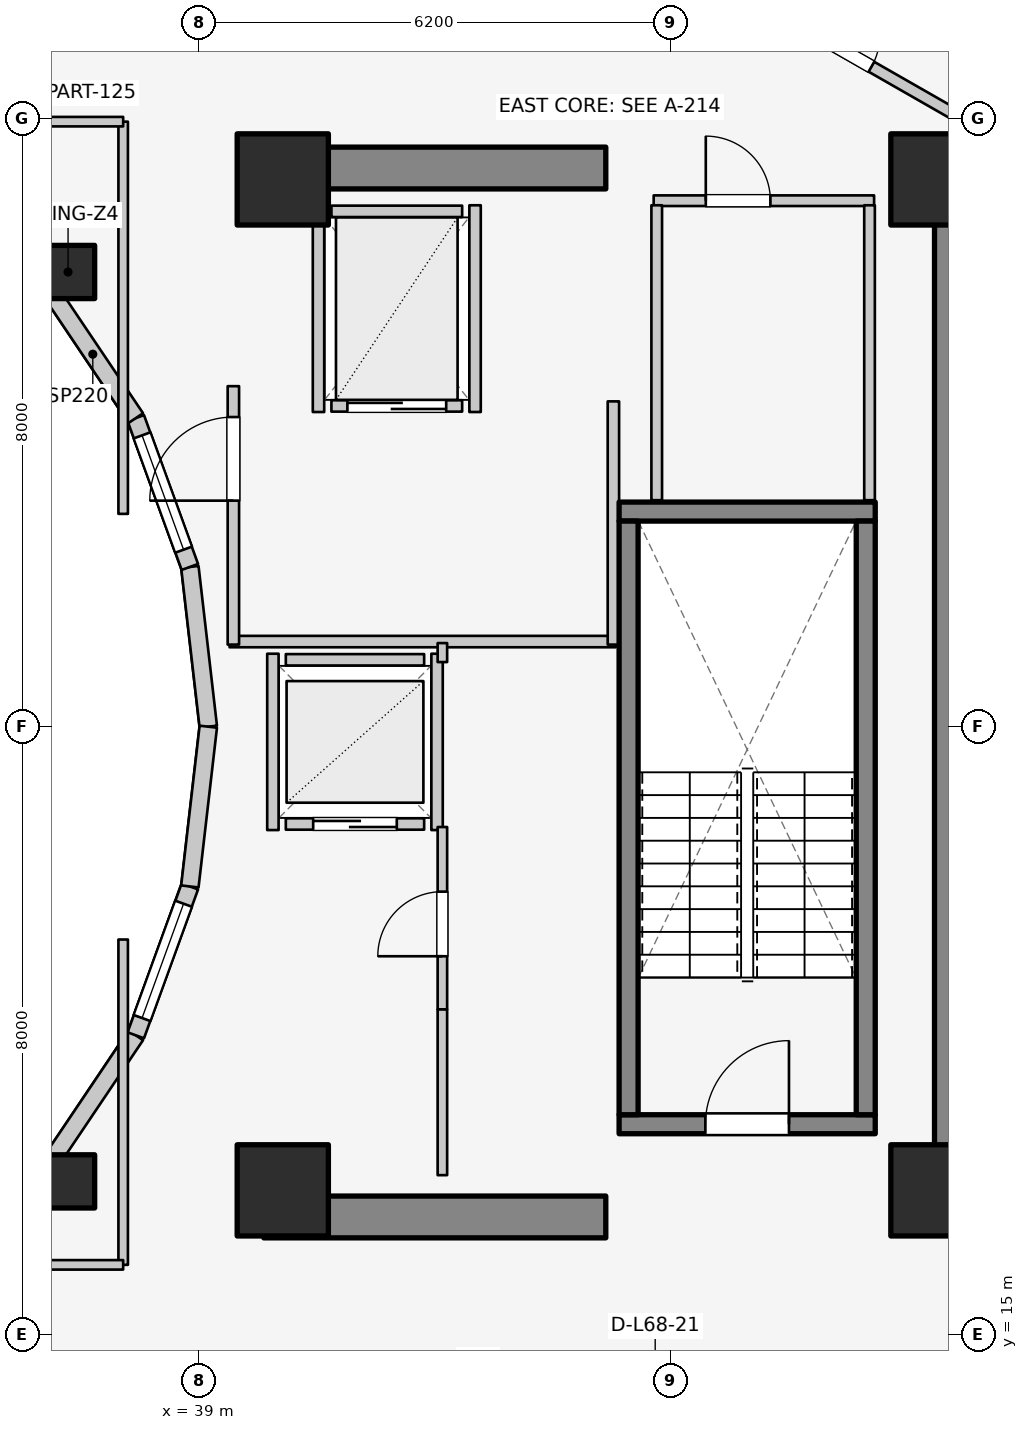
"""IFC4 building model, lengths in metres.
Left out: names, types, materials, properties, quantities, classifications, styles, units other than length and angle.
Written with IfcOpenShell. Run it as: python <this file> out.ifc"""

import sys

from ifc_helpers import new_model, si_unit, direction, frame, frame_2d, origin, origin_2d, place, context, subcontext, project, spatial, rectangle, extrude, element, fill, save


model = new_model("IFC4")
c1 = context("Model", 3, precision=1e-05, world=origin(), true_north=direction((0.0, 1.0)))
c2 = subcontext(c1, "Body", "Model", "MODEL_VIEW")
j1 = project(units=[si_unit("LENGTHUNIT", "METRE"), si_unit("PLANEANGLEUNIT", "RADIAN")], contexts=[c1])
p1 = place(None, origin())
s1 = spatial("IfcSite", under=j1, at=p1, CompositionType="ELEMENT")
p2 = place(p1, origin())
s2 = spatial("IfcBuilding", under=s1, at=p2, CompositionType="ELEMENT")
p3 = place(p2, frame((0.0, 0.0, 223.3)))
s3 = spatial("IfcBuildingStorey", under=s2, at=p3, CompositionType="ELEMENT", Elevation=223.3)
p4 = place(p3, frame((48.95, 17.05, 0.0), z_axis=(0.0, 0.0, 1.0), x_axis=(0.0, 1.0, 0.0)))
e1 = element("IfcWall", 1, at=p4, inside=s3, PredefinedType="SHEAR", context=c2, shape_type="SweptSolid", body=[
    extrude(rectangle(XDim=12.8, YDim=0.55, at=frame_2d((6.4, 0.0))), origin(), (0.0, 0.0, 1.0), 3.1),
])
for number, where, z_axis, x_axis in (
    (2, (39.85, 16.55, 0.0), (0.0, 0.0, 1.0), (1.0, 0.0, 0.0)),
    (3, (39.85, 30.35, 0.0), (0.0, 0.0, 1.0), (1.0, 0.0, 0.0)),
):
    element("IfcWall", number, at=place(p3, frame(where, z_axis=z_axis, x_axis=x_axis)), inside=s3, PredefinedType="SHEAR", context=c2, shape_type="SweptSolid", body=[
        extrude(rectangle(XDim=4.5, YDim=0.55, at=frame_2d((2.25, 0.0))), origin(), (0.0, 0.0, 1.0), 3.1),
    ])
p5 = place(p3, frame((44.525, 17.77, 0.0), z_axis=(0.0, 0.0, 1.0), x_axis=(1.0, 0.0, 0.0)))
e4 = element("IfcWall", 4, at=p5, inside=s3, PredefinedType="SOLIDWALL", context=c2, shape_type="SweptSolid", body=[
    extrude(rectangle(XDim=3.37, YDim=0.25, at=frame_2d((1.685, 0.0))), origin(), (0.0, 0.0, 1.0), 3.1),
])
p6 = place(p5, frame((1.135, 0.0, 0.0)))
e5 = element("IfcOpeningElement", 5, at=p6, cuts=e4, PredefinedType="OPENING", context=c2, shape_type="SweptSolid", body=[
    extrude(rectangle(XDim=1.1, YDim=2.1, at=frame_2d((0.55, 1.05))), frame((0.0, 0.135, 0.0), z_axis=(0.0, -1.0, 0.0), x_axis=(1.0, 0.0, 0.0)), (0.0, 0.0, 1.0), 0.27),
])
p7 = place(p3, frame((44.525, 25.83, 0.0), z_axis=(0.0, 0.0, 1.0), x_axis=(1.0, 0.0, 0.0)))
e6 = element("IfcWall", 6, at=p7, inside=s3, PredefinedType="SOLIDWALL", context=c2, shape_type="SweptSolid", body=[
    extrude(rectangle(XDim=3.37, YDim=0.25, at=frame_2d((1.685, 0.0))), origin(), (0.0, 0.0, 1.0), 3.1),
])
for number, where, z_axis, x_axis in (
    (7, (44.65, 17.895, 0.0), (0.0, 0.0, 1.0), (0.0, 1.0, 0.0)),
    (8, (47.77, 17.895, 0.0), (0.0, 0.0, 1.0), (0.0, 1.0, 0.0)),
):
    element("IfcWall", number, at=place(p3, frame(where, z_axis=z_axis, x_axis=x_axis)), inside=s3, PredefinedType="SOLIDWALL", context=c2, shape_type="SweptSolid", body=[
        extrude(rectangle(XDim=7.81, YDim=0.25, at=frame_2d((3.905, 0.0))), origin(), (0.0, 0.0, 1.0), 3.1),
    ])
for number, where, z_axis, x_axis in (
    (9, (40.1, 16.9, 0.0), (0.0, 0.0, 1.0), (1.0, 0.0, 0.0)),
    (10, (48.7, 16.9, 0.0), (0.0, 0.0, 1.0), (1.0, 0.0, 0.0)),
    (11, (48.7, 30.2, 0.0), (0.0, 0.0, 1.0), (1.0, 0.0, 0.0)),
    (12, (40.1, 30.2, 0.0), (0.0, 0.0, 1.0), (1.0, 0.0, 0.0)),
):
    element("IfcColumn", number, at=place(p3, frame(where, z_axis=z_axis, x_axis=x_axis)), inside=s3, PredefinedType="COLUMN", context=c2, shape_type="SweptSolid", body=[
        extrude(rectangle(XDim=1.2, YDim=1.2, at=origin_2d()), origin(), (0.0, 0.0, 1.0), 3.1),
    ])
for number, where, z_axis, x_axis in (
    (13, (37.275, 28.982, 0.0), (0.0, 0.0, 1.0), (1.0, 0.0, 0.0)),
    (14, (37.275, 17.018, 0.0), (0.0, 0.0, 1.0), (1.0, 0.0, 0.0)),
):
    element("IfcColumn", number, at=place(p3, frame(where, z_axis=z_axis, x_axis=x_axis)), inside=s3, PredefinedType="COLUMN", context=c2, shape_type="SweptSolid", body=[
        extrude(rectangle(XDim=0.7, YDim=0.7, at=origin_2d()), origin(), (0.0, 0.0, 1.0), 3.1),
    ])
p8 = place(p3, frame((39.12, 23.0, 0.0), z_axis=(0.0, 0.0, 1.0), x_axis=(-0.114711713601, 0.993398823617, 0.0)))
e15 = element("IfcWall", 15, at=p8, inside=s3, PredefinedType="STANDARD", context=c2, shape_type="SweptSolid", body=[
    extrude(rectangle(XDim=2.115, YDim=0.23, at=frame_2d((1.058, 0.0))), origin(), (0.0, 0.0, 1.0), 2.84),
])
p9 = place(p3, frame((38.877, 25.102, 0.0), z_axis=(0.0, 0.0, 1.0), x_axis=(-0.341423187295, 0.93990968033, 0.0)))
e16 = element("IfcWall", 16, at=p9, inside=s3, PredefinedType="STANDARD", context=c2, shape_type="SweptSolid", body=[
    extrude(rectangle(XDim=2.084, YDim=0.23, at=frame_2d((1.042, 0.0))), origin(), (0.0, 0.0, 1.0), 2.84),
])
p10 = place(p9, frame((0.242, 0.0, 0.85)))
e17 = element("IfcOpeningElement", 17, at=p10, cuts=e16, PredefinedType="OPENING", context=c2, shape_type="SweptSolid", body=[
    extrude(rectangle(XDim=1.6, YDim=1.65, at=frame_2d((0.8, 0.825))), frame((0.0, 0.125, 0.0), z_axis=(0.0, -1.0, 0.0), x_axis=(1.0, 0.0, 0.0)), (0.0, 0.0, 1.0), 0.25),
])
p11 = place(p3, frame((38.166, 27.06, 0.0), z_axis=(0.0, 0.0, 1.0), x_axis=(-0.558197800898, 0.829707909492, 0.0)))
e18 = element("IfcWall", 18, at=p11, inside=s3, PredefinedType="STANDARD", context=c2, shape_type="SweptSolid", body=[
    extrude(rectangle(XDim=2.027, YDim=0.23, at=frame_2d((1.013, 0.0))), origin(), (0.0, 0.0, 1.0), 2.16),
])
for number, where, z_axis, x_axis in (
    (19, (37.035, 28.742, 0.0), (0.0, 0.0, 1.0), (-0.753, 0.659, 0.0)),
    (20, (35.56, 15.968, 0.0), (0.0, 0.0, 1.0), (0.753, 0.659, 0.0)),
):
    element("IfcWall", number, at=place(p3, frame(where, z_axis=z_axis, x_axis=x_axis)), inside=s3, PredefinedType="STANDARD", context=c2, shape_type="SweptSolid", body=[
        extrude(rectangle(XDim=1.959, YDim=0.23, at=frame_2d((0.98, 0.0))), origin(), (0.0, 0.0, 1.0), 2.16),
    ])
p12 = place(p3, frame((37.035, 17.258, 0.0), z_axis=(0.0, 0.0, 1.0), x_axis=(0.558197800898, 0.829707909492, 0.0)))
e21 = element("IfcWall", 21, at=p12, inside=s3, PredefinedType="STANDARD", context=c2, shape_type="SweptSolid", body=[
    extrude(rectangle(XDim=2.027, YDim=0.23, at=frame_2d((1.013, 0.0))), origin(), (0.0, 0.0, 1.0), 2.16),
])
p13 = place(p3, frame((38.166, 18.94, 0.0), z_axis=(0.0, 0.0, 1.0), x_axis=(0.341423187295, 0.93990968033, 0.0)))
e22 = element("IfcWall", 22, at=p13, inside=s3, PredefinedType="STANDARD", context=c2, shape_type="SweptSolid", body=[
    extrude(rectangle(XDim=2.084, YDim=0.23, at=frame_2d((1.042, 0.0))), origin(), (0.0, 0.0, 1.0), 2.84),
])
p14 = place(p13, frame((0.242, 0.0, 0.85)))
e23 = element("IfcOpeningElement", 23, at=p14, cuts=e22, PredefinedType="OPENING", context=c2, shape_type="SweptSolid", body=[
    extrude(rectangle(XDim=1.6, YDim=1.65, at=frame_2d((0.8, 0.825))), frame((0.0, 0.125, 0.0), z_axis=(0.0, -1.0, 0.0), x_axis=(1.0, 0.0, 0.0)), (0.0, 0.0, 1.0), 0.25),
])
p15 = place(p3, frame((38.877, 20.898, 0.0), z_axis=(0.0, 0.0, 1.0), x_axis=(0.114711713601, 0.993398823617, 0.0)))
e24 = element("IfcWall", 24, at=p15, inside=s3, PredefinedType="STANDARD", context=c2, shape_type="SweptSolid", body=[
    extrude(rectangle(XDim=2.115, YDim=0.23, at=frame_2d((1.058, 0.0))), origin(), (0.0, 0.0, 1.0), 2.84),
])
p16 = place(p3, frame((50.761, 31.849, 0.0), z_axis=(0.0, 0.0, 1.0), x_axis=(-0.72731899451, 0.686299555752, 0.0)))
e25 = element("IfcWall", 25, at=p16, inside=s3, PredefinedType="STANDARD", context=c2, shape_type="SweptSolid", body=[
    extrude(rectangle(XDim=4.404, YDim=0.26, at=frame_2d((2.202, 0.0))), origin(), (0.0, 0.0, 1.0), 2.85),
])
p17 = place(p16, frame((0.867, 0.0, 0.75)))
e26 = element("IfcOpeningElement", 26, at=p17, cuts=e25, PredefinedType="OPENING", context=c2, shape_type="SweptSolid", body=[
    extrude(rectangle(XDim=1.2, YDim=1.5, at=frame_2d((0.6, 0.75))), frame((0.0, 0.14, 0.0), z_axis=(0.0, -1.0, 0.0), x_axis=(1.0, 0.0, 0.0)), (0.0, 0.0, 1.0), 0.28),
])
p18 = place(p3, frame((40.14, 21.72, 0.0), z_axis=(0.0, 0.0, 1.0), x_axis=(1.0, 0.0, 0.0)))
e27 = element("IfcWall", 27, at=p18, inside=s3, PredefinedType="SOLIDWALL", context=c2, shape_type="SweptSolid", body=[
    extrude(rectangle(XDim=1.82, YDim=0.15, at=frame_2d((0.91, 0.0))), origin(), (0.0, 0.0, 1.0), 2.12),
])
p19 = place(p18, frame((0.36, 0.0, 0.0)))
e28 = element("IfcOpeningElement", 28, at=p19, cuts=e27, PredefinedType="OPENING", context=c2, shape_type="SweptSolid", body=[
    extrude(rectangle(XDim=1.1, YDim=2.1, at=frame_2d((0.55, 1.05))), frame((0.0, 0.085, 0.0), z_axis=(0.0, -1.0, 0.0), x_axis=(1.0, 0.0, 0.0)), (0.0, 0.0, 1.0), 0.17),
])
p20 = place(p3, frame((40.14, 23.88, 0.0), z_axis=(0.0, 0.0, 1.0), x_axis=(1.0, 0.0, 0.0)))
e29 = element("IfcWall", 29, at=p20, inside=s3, PredefinedType="SOLIDWALL", context=c2, shape_type="SweptSolid", body=[
    extrude(rectangle(XDim=1.82, YDim=0.15, at=frame_2d((0.91, 0.0))), origin(), (0.0, 0.0, 1.0), 2.12),
])
p21 = place(p3, frame((39.97, 21.64, 0.0), z_axis=(0.0, 0.0, 1.0), x_axis=(0.0, 1.0, 0.0)))
e30 = element("IfcWall", 30, at=p21, inside=s3, PredefinedType="SOLIDWALL", context=c2, shape_type="SweptSolid", body=[
    extrude(rectangle(XDim=2.32, YDim=0.15, at=frame_2d((1.16, 0.0))), origin(), (0.0, 0.0, 1.0), 2.12),
])
p22 = place(p3, frame((42.13, 21.64, 0.0), z_axis=(0.0, 0.0, 1.0), x_axis=(0.0, 1.0, 0.0)))
e31 = element("IfcWall", 31, at=p22, inside=s3, PredefinedType="SOLIDWALL", context=c2, shape_type="SweptSolid", body=[
    extrude(rectangle(XDim=2.32, YDim=0.15, at=frame_2d((1.16, 0.0))), origin(), (0.0, 0.0, 1.0), 2.855),
])
p23 = place(p3, frame((40.74, 27.22, 0.0), z_axis=(0.0, 0.0, 1.0), x_axis=(1.0, 0.0, 0.0)))
e32 = element("IfcWall", 32, at=p23, inside=s3, PredefinedType="SOLIDWALL", context=c2, shape_type="SweptSolid", body=[
    extrude(rectangle(XDim=1.72, YDim=0.15, at=frame_2d((0.86, 0.0))), origin(), (0.0, 0.0, 1.0), 2.855),
])
p24 = place(p23, frame((0.21, 0.0, 0.0)))
e33 = element("IfcOpeningElement", 33, at=p24, cuts=e32, PredefinedType="OPENING", context=c2, shape_type="SweptSolid", body=[
    extrude(rectangle(XDim=1.3, YDim=2.1, at=frame_2d((0.65, 1.05))), frame((0.0, 0.085, 0.0), z_axis=(0.0, -1.0, 0.0), x_axis=(1.0, 0.0, 0.0)), (0.0, 0.0, 1.0), 0.17),
])
p25 = place(p3, frame((40.74, 29.78, 0.0), z_axis=(0.0, 0.0, 1.0), x_axis=(1.0, 0.0, 0.0)))
e34 = element("IfcWall", 34, at=p25, inside=s3, PredefinedType="SOLIDWALL", context=c2, shape_type="SweptSolid", body=[
    extrude(rectangle(XDim=1.72, YDim=0.15, at=frame_2d((0.86, 0.0))), origin(), (0.0, 0.0, 1.0), 2.855),
])
for number, where, z_axis, x_axis in (
    (35, (40.57, 27.14, 0.0), (0.0, 0.0, 1.0), (0.0, 1.0, 0.0)),
    (36, (42.63, 27.14, 0.0), (0.0, 0.0, 1.0), (0.0, 1.0, 0.0)),
):
    element("IfcWall", number, at=place(p3, frame(where, z_axis=z_axis, x_axis=x_axis)), inside=s3, PredefinedType="SOLIDWALL", context=c2, shape_type="SweptSolid", body=[
        extrude(rectangle(XDim=2.72, YDim=0.15, at=frame_2d((1.36, 0.0))), origin(), (0.0, 0.0, 1.0), 2.855),
    ])
p26 = place(p3, frame((39.4, 24.12, 0.0), z_axis=(0.0, 0.0, 1.0), x_axis=(1.0, 0.0, 0.0)))
e37 = element("IfcWall", 37, at=p26, inside=s3, PredefinedType="PARTITIONING", context=c2, shape_type="SweptSolid", body=[
    extrude(rectangle(XDim=5.08, YDim=0.15, at=frame_2d((2.54, 0.0))), origin(), (0.0, 0.0, 1.0), 2.12),
])
p27 = place(p3, frame((44.45, 24.08, 0.0), z_axis=(0.0, 0.0, 1.0), x_axis=(0.0, 1.0, 0.0)))
e38 = element("IfcWall", 38, at=p27, inside=s3, PredefinedType="PARTITIONING", context=c2, shape_type="SweptSolid", body=[
    extrude(rectangle(XDim=3.2, YDim=0.15, at=frame_2d((1.6, 0.0))), origin(), (0.0, 0.0, 1.0), 2.855),
])
p28 = place(p3, frame((39.45, 24.08, 0.0), z_axis=(0.0, 0.0, 1.0), x_axis=(0.0, 1.0, 0.0)))
e39 = element("IfcWall", 39, at=p28, inside=s3, PredefinedType="PARTITIONING", context=c2, shape_type="SweptSolid", body=[
    extrude(rectangle(XDim=3.4, YDim=0.15, at=frame_2d((1.7, 0.0))), origin(), (0.0, 0.0, 1.0), 2.855),
])
p29 = place(p28, frame((1.894, 0.0, 0.0)))
e40 = element("IfcOpeningElement", 40, at=p29, cuts=e39, PredefinedType="OPENING", context=c2, shape_type="SweptSolid", body=[
    extrude(rectangle(XDim=1.1, YDim=2.1, at=frame_2d((0.55, 1.05))), frame((0.0, 0.085, 0.0), z_axis=(0.0, -1.0, 0.0), x_axis=(1.0, 0.0, 0.0)), (0.0, 0.0, 1.0), 0.17),
])
p30 = place(p3, frame((42.2, 19.28, 0.0), z_axis=(0.0, 0.0, 1.0), x_axis=(0.0, 1.0, 0.0)))
e41 = element("IfcWall", 41, at=p30, inside=s3, PredefinedType="PARTITIONING", context=c2, shape_type="SweptSolid", body=[
    extrude(rectangle(XDim=2.4, YDim=0.125, at=frame_2d((1.2, 0.0))), origin(), (0.0, 0.0, 1.0), 2.855),
])
p31 = place(p30, frame((0.7, 0.0, 0.0)))
e42 = element("IfcOpeningElement", 42, at=p31, cuts=e41, PredefinedType="OPENING", context=c2, shape_type="SweptSolid", body=[
    extrude(rectangle(XDim=0.85, YDim=2.05, at=frame_2d((0.425, 1.025))), frame((0.0, 0.073, 0.0), z_axis=(0.0, -1.0, 0.0), x_axis=(1.0, 0.0, 0.0)), (0.0, 0.0, 1.0), 0.145),
])
p32 = place(p3, frame((42.2, 23.85, 0.0), z_axis=(0.0, 0.0, 1.0), x_axis=(0.0, 1.0, 0.0)))
e43 = element("IfcWall", 43, at=p32, inside=s3, PredefinedType="PARTITIONING", context=c2, shape_type="SweptSolid", body=[
    extrude(rectangle(XDim=0.25, YDim=0.125, at=frame_2d((0.125, 0.0))), origin(), (0.0, 0.0, 1.0), 2.855),
])
p33 = place(p3, frame((42.2, 17.1, 0.0), z_axis=(0.0, 0.0, 1.0), x_axis=(0.0, 1.0, 0.0)))
e44 = element("IfcWall", 44, at=p33, inside=s3, PredefinedType="PARTITIONING", context=c2, shape_type="SweptSolid", body=[
    extrude(rectangle(XDim=2.18, YDim=0.125, at=frame_2d((1.09, 0.0))), origin(), (0.0, 0.0, 1.0), 2.855),
])
p34 = place(p3, frame((44.98, 29.92, 0.0), z_axis=(0.0, 0.0, 1.0), x_axis=(1.0, 0.0, 0.0)))
e45 = element("IfcWall", 45, at=p34, inside=s3, PredefinedType="PLUMBINGWALL", context=c2, shape_type="SweptSolid", body=[
    extrude(rectangle(XDim=2.9, YDim=0.14, at=frame_2d((1.45, 0.0))), origin(), (0.0, 0.0, 1.0), 2.855),
])
p35 = place(p34, frame((0.686, 0.0, 0.0)))
e46 = element("IfcOpeningElement", 46, at=p35, cuts=e45, PredefinedType="OPENING", context=c2, shape_type="SweptSolid", body=[
    extrude(rectangle(XDim=0.85, YDim=2.05, at=frame_2d((0.425, 1.025))), frame((0.0, 0.08, 0.0), z_axis=(0.0, -1.0, 0.0), x_axis=(1.0, 0.0, 0.0)), (0.0, 0.0, 1.0), 0.16),
])
for number, where, z_axis, x_axis in (
    (47, (45.02, 25.98, 0.0), (0.0, 0.0, 1.0), (0.0, 1.0, 0.0)),
    (48, (47.82, 25.98, 0.0), (0.0, 0.0, 1.0), (0.0, 1.0, 0.0)),
):
    element("IfcWall", number, at=place(p3, frame(where, z_axis=z_axis, x_axis=x_axis)), inside=s3, PredefinedType="PLUMBINGWALL", context=c2, shape_type="SweptSolid", body=[
        extrude(rectangle(XDim=3.88, YDim=0.14, at=frame_2d((1.94, 0.0))), origin(), (0.0, 0.0, 1.0), 2.855),
    ])
p36 = place(p3, frame((35.55, 30.015, 0.0), z_axis=(0.0, 0.0, 1.0), x_axis=(0.523992004803, 0.851723182086, 0.0)))
e49 = element("IfcWall", 49, at=p36, inside=s3, PredefinedType="PARTITIONING", context=c2, shape_type="SweptSolid", body=[
    extrude(rectangle(XDim=3.101, YDim=0.125, at=frame_2d((1.551, 0.0))), origin(), (0.0, 0.0, 1.0), 2.376),
])
p37 = place(p3, frame((38.0, 25.8, 0.0), z_axis=(0.0, 0.0, 1.0), x_axis=(0.0, 1.0, 0.0)))
e50 = element("IfcWall", 50, at=p37, inside=s3, PredefinedType="PARTITIONING", context=c2, shape_type="SweptSolid", body=[
    extrude(rectangle(XDim=5.16, YDim=0.125, at=frame_2d((2.58, 0.0))), origin(), (0.0, 0.0, 1.0), 2.232),
])
p38 = place(p3, frame((35.4, 30.96, 0.0), z_axis=(0.0, 0.0, 1.0), x_axis=(1.0, 0.0, 0.0)))
e51 = element("IfcWall", 51, at=p38, inside=s3, PredefinedType="PARTITIONING", context=c2, shape_type="SweptSolid", body=[
    extrude(rectangle(XDim=2.6, YDim=0.125, at=frame_2d((1.3, 0.0))), origin(), (0.0, 0.0, 1.0), 2.376),
])
p39 = place(p3, frame((38.0, 15.92, 0.0), z_axis=(0.0, 0.0, 1.0), x_axis=(0.0, 1.0, 0.0)))
e52 = element("IfcWall", 52, at=p39, inside=s3, PredefinedType="PARTITIONING", context=c2, shape_type="SweptSolid", body=[
    extrude(rectangle(XDim=4.28, YDim=0.125, at=frame_2d((2.14, 0.0))), origin(), (0.0, 0.0, 1.0), 2.232),
])
p40 = place(p3, frame((35.4, 15.92, 0.0), z_axis=(0.0, 0.0, 1.0), x_axis=(1.0, 0.0, 0.0)))
e53 = element("IfcWall", 53, at=p40, inside=s3, PredefinedType="PARTITIONING", context=c2, shape_type="SweptSolid", body=[
    extrude(rectangle(XDim=2.6, YDim=0.125, at=frame_2d((1.3, 0.0))), origin(), (0.0, 0.0, 1.0), 2.232),
])
p41 = place(p3, frame((46.757, 32.305, 0.0), z_axis=(0.0, 0.0, 1.0), x_axis=(0.867991349648, -0.496579315857, 0.0)))
e54 = element("IfcWall", 54, at=p41, inside=s3, PredefinedType="PARTITIONING", context=c2, shape_type="SweptSolid", body=[
    extrude(rectangle(XDim=2.567, YDim=0.15, at=frame_2d((1.283, 0.0))), origin(), (0.0, 0.0, 1.0), 2.22),
])
p42 = place(p41, frame((0.404, 0.0, 0.0)))
e55 = element("IfcOpeningElement", 55, at=p42, cuts=e54, PredefinedType="OPENING", context=c2, shape_type="SweptSolid", body=[
    extrude(rectangle(XDim=0.85, YDim=2.05, at=frame_2d((0.425, 1.025))), frame((0.0, 0.085, 0.0), z_axis=(0.0, -1.0, 0.0), x_axis=(1.0, 0.0, 0.0)), (0.0, 0.0, 1.0), 0.17),
])
p43 = place(p10, origin())
e56 = element("IfcWindow", 56, at=p43, inside=s3, PartitioningType="SINGLE_PANEL", PredefinedType="WINDOW", context=c2, shape_type="SweptSolid", body=[
    extrude(rectangle(XDim=1.6, YDim=1.65, at=frame_2d((0.8, 0.825))), frame((0.0, 0.03, 0.0), z_axis=(0.0, -1.0, 0.0), x_axis=(1.0, 0.0, 0.0)), (0.0, 0.0, 1.0), 0.06),
])
fill(e17, e56)
p44 = place(p14, origin())
e57 = element("IfcWindow", 57, at=p44, inside=s3, PartitioningType="SINGLE_PANEL", PredefinedType="WINDOW", context=c2, shape_type="SweptSolid", body=[
    extrude(rectangle(XDim=1.6, YDim=1.65, at=frame_2d((0.8, 0.825))), frame((0.0, 0.03, 0.0), z_axis=(0.0, -1.0, 0.0), x_axis=(1.0, 0.0, 0.0)), (0.0, 0.0, 1.0), 0.06),
])
fill(e23, e57)
p45 = place(p6, origin())
e58 = element("IfcDoor", 58, at=p45, inside=s3, OperationType="SINGLE_SWING_RIGHT", PredefinedType="DOOR", context=c2, shape_type="SweptSolid", body=[
    extrude(rectangle(XDim=1.1, YDim=2.1, at=frame_2d((0.55, 1.05))), frame((0.0, 0.025, 0.0), z_axis=(0.0, -1.0, 0.0), x_axis=(1.0, 0.0, 0.0)), (0.0, 0.0, 1.0), 0.05),
])
fill(e5, e58)
p46 = place(p19, origin())
e59 = element("IfcDoor", 59, at=p46, inside=s3, OperationType="DOUBLE_DOOR_SLIDING", PredefinedType="DOOR", context=c2, shape_type="SweptSolid", body=[
    extrude(rectangle(XDim=1.1, YDim=2.1, at=frame_2d((0.55, 1.05))), frame((0.0, 0.025, 0.0), z_axis=(0.0, -1.0, 0.0), x_axis=(1.0, 0.0, 0.0)), (0.0, 0.0, 1.0), 0.05),
])
fill(e28, e59)
p47 = place(p24, origin())
e60 = element("IfcDoor", 60, at=p47, inside=s3, OperationType="DOUBLE_DOOR_SLIDING", PredefinedType="DOOR", context=c2, shape_type="SweptSolid", body=[
    extrude(rectangle(XDim=1.3, YDim=2.1, at=frame_2d((0.65, 1.05))), frame((0.0, 0.025, 0.0), z_axis=(0.0, -1.0, 0.0), x_axis=(1.0, 0.0, 0.0)), (0.0, 0.0, 1.0), 0.05),
])
fill(e33, e60)
p48 = place(p29, origin())
e61 = element("IfcDoor", 61, at=p48, inside=s3, OperationType="SINGLE_SWING_LEFT", PredefinedType="DOOR", context=c2, shape_type="SweptSolid", body=[
    extrude(rectangle(XDim=1.1, YDim=2.1, at=frame_2d((0.55, 1.05))), frame((0.0, 0.025, 0.0), z_axis=(0.0, -1.0, 0.0), x_axis=(1.0, 0.0, 0.0)), (0.0, 0.0, 1.0), 0.05),
])
fill(e40, e61)
p49 = place(p31, origin())
e62 = element("IfcDoor", 62, at=p49, inside=s3, OperationType="SINGLE_SWING_LEFT", PredefinedType="DOOR", context=c2, shape_type="SweptSolid", body=[
    extrude(rectangle(XDim=0.85, YDim=2.05, at=frame_2d((0.425, 1.025))), frame((0.0, 0.025, 0.0), z_axis=(0.0, -1.0, 0.0), x_axis=(1.0, 0.0, 0.0)), (0.0, 0.0, 1.0), 0.05),
])
fill(e42, e62)
p50 = place(p35, origin())
e63 = element("IfcDoor", 63, at=p50, inside=s3, OperationType="SINGLE_SWING_LEFT", PredefinedType="DOOR", context=c2, shape_type="SweptSolid", body=[
    extrude(rectangle(XDim=0.85, YDim=2.05, at=frame_2d((0.425, 1.025))), frame((0.0, 0.025, 0.0), z_axis=(0.0, -1.0, 0.0), x_axis=(1.0, 0.0, 0.0)), (0.0, 0.0, 1.0), 0.05),
])
fill(e46, e63)
p51 = place(p42, origin())
e64 = element("IfcDoor", 64, at=p51, inside=s3, OperationType="SINGLE_SWING_LEFT", PredefinedType="DOOR", context=c2, shape_type="SweptSolid", body=[
    extrude(rectangle(XDim=0.85, YDim=2.05, at=frame_2d((0.425, 1.025))), frame((0.0, 0.025, 0.0), z_axis=(0.0, -1.0, 0.0), x_axis=(1.0, 0.0, 0.0)), (0.0, 0.0, 1.0), 0.05),
])
fill(e55, e64)
save(model, sys.argv[1])
